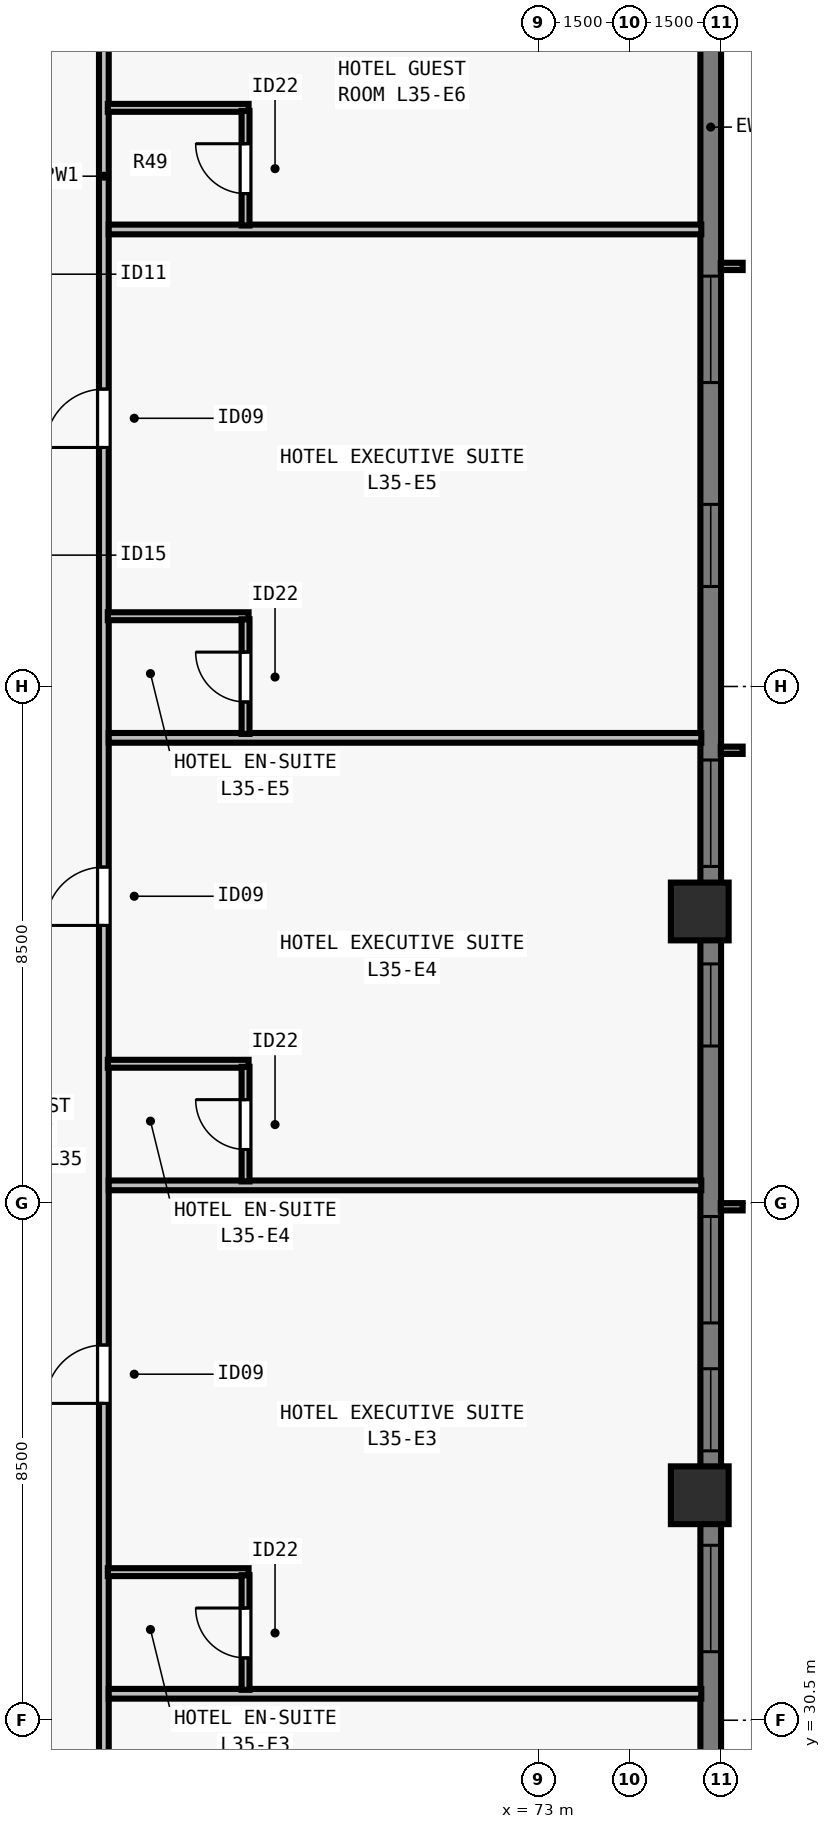
"""IFC4 building model, lengths in metres.
Left out: names, types, materials, properties, quantities, classifications, styles, units other than length and angle.
Written with IfcOpenShell. Run it as: python <this file> out.ifc"""

import sys

from ifc_helpers import new_model, si_unit, direction, frame, frame_2d, origin, origin_2d, place, context, subcontext, project, spatial, rectangle, extrude, element, fill, save


model = new_model("IFC4")
c1 = context("Model", 3, precision=1e-05, world=origin(), true_north=direction((0.0, 1.0)))
c2 = subcontext(c1, "Body", "Model", "MODEL_VIEW")
j1 = project(units=[si_unit("LENGTHUNIT", "METRE"), si_unit("PLANEANGLEUNIT", "RADIAN")], contexts=[c1])
p1 = place(None, origin())
s1 = spatial("IfcSite", under=j1, at=p1, CompositionType="ELEMENT")
p2 = place(p1, origin())
s2 = spatial("IfcBuilding", under=s1, at=p2, CompositionType="ELEMENT")
p3 = place(p2, frame((0.0, 0.0, 130.5)))
s3 = spatial("IfcBuildingStorey", under=s2, at=p3, CompositionType="ELEMENT", Elevation=130.5)
for number, where, z_axis, x_axis in (
    (1, (75.65, 34.2, 0.0), (0.0, 0.0, 1.0), (0.0, 1.0, 0.0)),
    (2, (75.65, 43.8, 0.0), (0.0, 0.0, 1.0), (0.0, 1.0, 0.0)),
):
    element("IfcColumn", number, at=place(p3, frame(where, z_axis=z_axis, x_axis=x_axis)), inside=s3, PredefinedType="COLUMN", context=c2, shape_type="SweptSolid", body=[
        extrude(rectangle(XDim=0.95, YDim=0.95, at=origin_2d()), origin(), (0.0, 0.0, 1.0), 3.5),
    ])
p4 = place(p3, frame((75.83, 59.0, 0.0), z_axis=(0.0, 0.0, 1.0), x_axis=(0.0, -1.0, 0.0)))
e3 = element("IfcWall", 3, at=p4, inside=s3, PredefinedType="SOLIDWALL", context=c2, shape_type="SweptSolid", body=[
    extrude(rectangle(XDim=39.682, YDim=0.34, at=frame_2d((19.841, 0.0))), origin(), (0.0, 0.0, 1.0), 3.28),
])
p5 = place(p4, frame((4.752, 0.0, 0.8)))
e4 = element("IfcOpeningElement", 4, at=p5, cuts=e3, PredefinedType="OPENING", context=c2, shape_type="SweptSolid", body=[
    extrude(rectangle(XDim=1.75, YDim=1.66, at=frame_2d((0.875, 0.83))), frame((0.0, 0.18, 0.0), z_axis=(0.0, -1.0, 0.0), x_axis=(1.0, 0.0, 0.0)), (0.0, 0.0, 1.0), 0.36),
])
p6 = place(p4, frame((8.505, 0.0, 0.8)))
e5 = element("IfcOpeningElement", 5, at=p6, cuts=e3, PredefinedType="OPENING", context=c2, shape_type="SweptSolid", body=[
    extrude(rectangle(XDim=1.35, YDim=1.66, at=frame_2d((0.675, 0.83))), frame((0.0, 0.18, 0.0), z_axis=(0.0, -1.0, 0.0), x_axis=(1.0, 0.0, 0.0)), (0.0, 0.0, 1.0), 0.36),
])
p7 = place(p4, frame((12.709, 0.0, 0.8)))
e6 = element("IfcOpeningElement", 6, at=p7, cuts=e3, PredefinedType="OPENING", context=c2, shape_type="SweptSolid", body=[
    extrude(rectangle(XDim=1.75, YDim=1.66, at=frame_2d((0.875, 0.83))), frame((0.0, 0.18, 0.0), z_axis=(0.0, -1.0, 0.0), x_axis=(1.0, 0.0, 0.0)), (0.0, 0.0, 1.0), 0.36),
])
p8 = place(p4, frame((16.062, 0.0, 0.8)))
e7 = element("IfcOpeningElement", 7, at=p8, cuts=e3, PredefinedType="OPENING", context=c2, shape_type="SweptSolid", body=[
    extrude(rectangle(XDim=1.35, YDim=1.66, at=frame_2d((0.675, 0.83))), frame((0.0, 0.18, 0.0), z_axis=(0.0, -1.0, 0.0), x_axis=(1.0, 0.0, 0.0)), (0.0, 0.0, 1.0), 0.36),
])
p9 = place(p4, frame((20.216, 0.0, 0.8)))
e8 = element("IfcOpeningElement", 8, at=p9, cuts=e3, PredefinedType="OPENING", context=c2, shape_type="SweptSolid", body=[
    extrude(rectangle(XDim=1.75, YDim=1.66, at=frame_2d((0.875, 0.83))), frame((0.0, 0.18, 0.0), z_axis=(0.0, -1.0, 0.0), x_axis=(1.0, 0.0, 0.0)), (0.0, 0.0, 1.0), 0.36),
])
p10 = place(p4, frame((22.719, 0.0, 0.8)))
e9 = element("IfcOpeningElement", 9, at=p10, cuts=e3, PredefinedType="OPENING", context=c2, shape_type="SweptSolid", body=[
    extrude(rectangle(XDim=1.35, YDim=1.66, at=frame_2d((0.675, 0.83))), frame((0.0, 0.18, 0.0), z_axis=(0.0, -1.0, 0.0), x_axis=(1.0, 0.0, 0.0)), (0.0, 0.0, 1.0), 0.36),
])
p11 = place(p4, frame((25.623, 0.0, 0.8)))
e10 = element("IfcOpeningElement", 10, at=p11, cuts=e3, PredefinedType="OPENING", context=c2, shape_type="SweptSolid", body=[
    extrude(rectangle(XDim=1.75, YDim=1.66, at=frame_2d((0.875, 0.83))), frame((0.0, 0.18, 0.0), z_axis=(0.0, -1.0, 0.0), x_axis=(1.0, 0.0, 0.0)), (0.0, 0.0, 1.0), 0.36),
])
p12 = place(p4, frame((29.827, 0.0, 0.8)))
e11 = element("IfcOpeningElement", 11, at=p12, cuts=e3, PredefinedType="OPENING", context=c2, shape_type="SweptSolid", body=[
    extrude(rectangle(XDim=1.35, YDim=1.66, at=frame_2d((0.675, 0.83))), frame((0.0, 0.18, 0.0), z_axis=(0.0, -1.0, 0.0), x_axis=(1.0, 0.0, 0.0)), (0.0, 0.0, 1.0), 0.36),
])
p13 = place(p4, frame((33.18, 0.0, 0.8)))
e12 = element("IfcOpeningElement", 12, at=p13, cuts=e3, PredefinedType="OPENING", context=c2, shape_type="SweptSolid", body=[
    extrude(rectangle(XDim=1.75, YDim=1.66, at=frame_2d((0.875, 0.83))), frame((0.0, 0.18, 0.0), z_axis=(0.0, -1.0, 0.0), x_axis=(1.0, 0.0, 0.0)), (0.0, 0.0, 1.0), 0.36),
])
p14 = place(p4, frame((35.83, 0.0, 0.8)))
e13 = element("IfcOpeningElement", 13, at=p14, cuts=e3, PredefinedType="OPENING", context=c2, shape_type="SweptSolid", body=[
    extrude(rectangle(XDim=0.9, YDim=1.66, at=frame_2d((0.45, 0.83))), frame((0.0, 0.18, 0.0), z_axis=(0.0, -1.0, 0.0), x_axis=(1.0, 0.0, 0.0)), (0.0, 0.0, 1.0), 0.36),
])
p15 = place(p3, frame((65.85, 15.325, 0.0), z_axis=(0.0, 0.0, 1.0), x_axis=(0.0, 1.0, 0.0)))
e14 = element("IfcWall", 14, at=p15, inside=s3, PredefinedType="PARTITIONING", context=c2, shape_type="SweptSolid", body=[
    extrude(rectangle(XDim=47.35, YDim=0.16, at=frame_2d((23.675, 0.0))), origin(), (0.0, 0.0, 1.0), 2.555),
])
p16 = place(p15, frame((4.993, 0.0, 0.0)))
e15 = element("IfcOpeningElement", 15, at=p16, cuts=e14, PredefinedType="OPENING", context=c2, shape_type="SweptSolid", body=[
    extrude(rectangle(XDim=0.96, YDim=2.15, at=frame_2d((0.48, 1.075))), frame((0.0, 0.09, 0.0), z_axis=(0.0, -1.0, 0.0), x_axis=(1.0, 0.0, 0.0)), (0.0, 0.0, 1.0), 0.18),
])
p17 = place(p15, frame((12.525, 0.0, 0.0)))
e16 = element("IfcOpeningElement", 16, at=p17, cuts=e14, PredefinedType="OPENING", context=c2, shape_type="SweptSolid", body=[
    extrude(rectangle(XDim=0.96, YDim=2.15, at=frame_2d((0.48, 1.075))), frame((0.0, 0.09, 0.0), z_axis=(0.0, -1.0, 0.0), x_axis=(1.0, 0.0, 0.0)), (0.0, 0.0, 1.0), 0.18),
])
p18 = place(p15, frame((20.385, 0.0, 0.0)))
e17 = element("IfcOpeningElement", 17, at=p18, cuts=e14, PredefinedType="OPENING", context=c2, shape_type="SweptSolid", body=[
    extrude(rectangle(XDim=0.96, YDim=2.15, at=frame_2d((0.48, 1.075))), frame((0.0, 0.09, 0.0), z_axis=(0.0, -1.0, 0.0), x_axis=(1.0, 0.0, 0.0)), (0.0, 0.0, 1.0), 0.18),
])
p19 = place(p15, frame((28.246, 0.0, 0.0)))
e18 = element("IfcOpeningElement", 18, at=p19, cuts=e14, PredefinedType="OPENING", context=c2, shape_type="SweptSolid", body=[
    extrude(rectangle(XDim=0.96, YDim=2.15, at=frame_2d((0.48, 1.075))), frame((0.0, 0.09, 0.0), z_axis=(0.0, -1.0, 0.0), x_axis=(1.0, 0.0, 0.0)), (0.0, 0.0, 1.0), 0.18),
])
p20 = place(p15, frame((36.105, 0.0, 0.0)))
e19 = element("IfcOpeningElement", 19, at=p20, cuts=e14, PredefinedType="OPENING", context=c2, shape_type="SweptSolid", body=[
    extrude(rectangle(XDim=0.96, YDim=2.15, at=frame_2d((0.48, 1.075))), frame((0.0, 0.09, 0.0), z_axis=(0.0, -1.0, 0.0), x_axis=(1.0, 0.0, 0.0)), (0.0, 0.0, 1.0), 0.18),
])
p21 = place(p15, frame((44.068, 0.0, 0.0)))
e20 = element("IfcOpeningElement", 20, at=p21, cuts=e14, PredefinedType="OPENING", context=c2, shape_type="SweptSolid", body=[
    extrude(rectangle(XDim=0.96, YDim=2.15, at=frame_2d((0.48, 1.075))), frame((0.0, 0.09, 0.0), z_axis=(0.0, -1.0, 0.0), x_axis=(1.0, 0.0, 0.0)), (0.0, 0.0, 1.0), 0.18),
])
p22 = place(p3, frame((65.93, 30.935, 0.0), z_axis=(0.0, 0.0, 1.0), x_axis=(1.0, 0.0, 0.0)))
e21 = element("IfcWall", 21, at=p22, inside=s3, PredefinedType="PARTITIONING", context=c2, shape_type="SweptSolid", body=[
    extrude(rectangle(XDim=9.745, YDim=0.16, at=frame_2d((4.873, 0.0))), origin(), (0.0, 0.0, 1.0), 3.28),
])
p23 = place(p3, frame((65.915, 32.935, 0.0), z_axis=(0.0, 0.0, 1.0), x_axis=(1.0, 0.0, 0.0)))
e22 = element("IfcWall", 22, at=p23, inside=s3, PredefinedType="PLUMBINGWALL", context=c2, shape_type="SweptSolid", body=[
    extrude(rectangle(XDim=2.315, YDim=0.13, at=frame_2d((1.157, 0.0))), origin(), (0.0, 0.0, 1.0), 3.28),
])
p24 = place(p3, frame((68.18, 31.0, 0.0), z_axis=(0.0, 0.0, 1.0), x_axis=(0.0, 1.0, 0.0)))
e23 = element("IfcWall", 23, at=p24, inside=s3, PredefinedType="PLUMBINGWALL", context=c2, shape_type="SweptSolid", body=[
    extrude(rectangle(XDim=1.885, YDim=0.13, at=frame_2d((0.942, 0.0))), origin(), (0.0, 0.0, 1.0), 3.28),
])
p25 = place(p24, frame((0.525, 0.0, 0.0)))
e24 = element("IfcOpeningElement", 24, at=p25, cuts=e23, PredefinedType="OPENING", context=c2, shape_type="SweptSolid", body=[
    extrude(rectangle(XDim=0.82, YDim=2.1, at=frame_2d((0.41, 1.05))), frame((0.0, 0.075, 0.0), z_axis=(0.0, -1.0, 0.0), x_axis=(1.0, 0.0, 0.0)), (0.0, 0.0, 1.0), 0.15),
])
p26 = place(p3, frame((65.93, 39.296, 0.0), z_axis=(0.0, 0.0, 1.0), x_axis=(1.0, 0.0, 0.0)))
e25 = element("IfcWall", 25, at=p26, inside=s3, PredefinedType="PARTITIONING", context=c2, shape_type="SweptSolid", body=[
    extrude(rectangle(XDim=9.745, YDim=0.16, at=frame_2d((4.873, 0.0))), origin(), (0.0, 0.0, 1.0), 3.28),
])
p27 = place(p3, frame((65.915, 41.296, 0.0), z_axis=(0.0, 0.0, 1.0), x_axis=(1.0, 0.0, 0.0)))
e26 = element("IfcWall", 26, at=p27, inside=s3, PredefinedType="PLUMBINGWALL", context=c2, shape_type="SweptSolid", body=[
    extrude(rectangle(XDim=2.315, YDim=0.13, at=frame_2d((1.157, 0.0))), origin(), (0.0, 0.0, 1.0), 3.28),
])
p28 = place(p3, frame((68.18, 39.361, 0.0), z_axis=(0.0, 0.0, 1.0), x_axis=(0.0, 1.0, 0.0)))
e27 = element("IfcWall", 27, at=p28, inside=s3, PredefinedType="PLUMBINGWALL", context=c2, shape_type="SweptSolid", body=[
    extrude(rectangle(XDim=1.885, YDim=0.13, at=frame_2d((0.942, 0.0))), origin(), (0.0, 0.0, 1.0), 3.28),
])
p29 = place(p28, frame((0.525, 0.0, 0.0)))
e28 = element("IfcOpeningElement", 28, at=p29, cuts=e27, PredefinedType="OPENING", context=c2, shape_type="SweptSolid", body=[
    extrude(rectangle(XDim=0.82, YDim=2.1, at=frame_2d((0.41, 1.05))), frame((0.0, 0.075, 0.0), z_axis=(0.0, -1.0, 0.0), x_axis=(1.0, 0.0, 0.0)), (0.0, 0.0, 1.0), 0.15),
])
p30 = place(p3, frame((65.93, 46.655, 0.0), z_axis=(0.0, 0.0, 1.0), x_axis=(1.0, 0.0, 0.0)))
e29 = element("IfcWall", 29, at=p30, inside=s3, PredefinedType="PARTITIONING", context=c2, shape_type="SweptSolid", body=[
    extrude(rectangle(XDim=9.745, YDim=0.16, at=frame_2d((4.873, 0.0))), origin(), (0.0, 0.0, 1.0), 3.28),
])
p31 = place(p3, frame((65.915, 48.655, 0.0), z_axis=(0.0, 0.0, 1.0), x_axis=(1.0, 0.0, 0.0)))
e30 = element("IfcWall", 30, at=p31, inside=s3, PredefinedType="PLUMBINGWALL", context=c2, shape_type="SweptSolid", body=[
    extrude(rectangle(XDim=2.315, YDim=0.13, at=frame_2d((1.157, 0.0))), origin(), (0.0, 0.0, 1.0), 3.28),
])
p32 = place(p3, frame((68.18, 46.72, 0.0), z_axis=(0.0, 0.0, 1.0), x_axis=(0.0, 1.0, 0.0)))
e31 = element("IfcWall", 31, at=p32, inside=s3, PredefinedType="PLUMBINGWALL", context=c2, shape_type="SweptSolid", body=[
    extrude(rectangle(XDim=1.885, YDim=0.13, at=frame_2d((0.942, 0.0))), origin(), (0.0, 0.0, 1.0), 3.28),
])
p33 = place(p32, frame((0.525, 0.0, 0.0)))
e32 = element("IfcOpeningElement", 32, at=p33, cuts=e31, PredefinedType="OPENING", context=c2, shape_type="SweptSolid", body=[
    extrude(rectangle(XDim=0.82, YDim=2.1, at=frame_2d((0.41, 1.05))), frame((0.0, 0.075, 0.0), z_axis=(0.0, -1.0, 0.0), x_axis=(1.0, 0.0, 0.0)), (0.0, 0.0, 1.0), 0.15),
])
p34 = place(p3, frame((65.93, 55.016, 0.0), z_axis=(0.0, 0.0, 1.0), x_axis=(1.0, 0.0, 0.0)))
e33 = element("IfcWall", 33, at=p34, inside=s3, PredefinedType="PARTITIONING", context=c2, shape_type="SweptSolid", body=[
    extrude(rectangle(XDim=9.745, YDim=0.16, at=frame_2d((4.873, 0.0))), origin(), (0.0, 0.0, 1.0), 2.896),
])
p35 = place(p3, frame((65.915, 57.016, 0.0), z_axis=(0.0, 0.0, 1.0), x_axis=(1.0, 0.0, 0.0)))
e34 = element("IfcWall", 34, at=p35, inside=s3, PredefinedType="PLUMBINGWALL", context=c2, shape_type="SweptSolid", body=[
    extrude(rectangle(XDim=2.315, YDim=0.13, at=frame_2d((1.157, 0.0))), origin(), (0.0, 0.0, 1.0), 3.28),
])
p36 = place(p3, frame((68.18, 55.081, 0.0), z_axis=(0.0, 0.0, 1.0), x_axis=(0.0, 1.0, 0.0)))
e35 = element("IfcWall", 35, at=p36, inside=s3, PredefinedType="PLUMBINGWALL", context=c2, shape_type="SweptSolid", body=[
    extrude(rectangle(XDim=1.885, YDim=0.13, at=frame_2d((0.942, 0.0))), origin(), (0.0, 0.0, 1.0), 3.28),
])
p37 = place(p36, frame((0.525, 0.0, 0.0)))
e36 = element("IfcOpeningElement", 36, at=p37, cuts=e35, PredefinedType="OPENING", context=c2, shape_type="SweptSolid", body=[
    extrude(rectangle(XDim=0.82, YDim=2.1, at=frame_2d((0.41, 1.05))), frame((0.0, 0.075, 0.0), z_axis=(0.0, -1.0, 0.0), x_axis=(1.0, 0.0, 0.0)), (0.0, 0.0, 1.0), 0.15),
])
p38 = place(p5, origin())
e37 = element("IfcWindow", 37, at=p38, inside=s3, PartitioningType="SINGLE_PANEL", PredefinedType="WINDOW", context=c2, shape_type="SweptSolid", body=[
    extrude(rectangle(XDim=1.75, YDim=1.66, at=frame_2d((0.875, 0.83))), frame((0.0, -0.05, 0.0), z_axis=(0.0, -1.0, 0.0), x_axis=(1.0, 0.0, 0.0)), (0.0, 0.0, 1.0), 0.06),
])
fill(e4, e37)
p39 = place(p6, origin())
e38 = element("IfcWindow", 38, at=p39, inside=s3, PartitioningType="SINGLE_PANEL", PredefinedType="WINDOW", context=c2, shape_type="SweptSolid", body=[
    extrude(rectangle(XDim=1.35, YDim=1.66, at=frame_2d((0.675, 0.83))), frame((0.0, -0.05, 0.0), z_axis=(0.0, -1.0, 0.0), x_axis=(1.0, 0.0, 0.0)), (0.0, 0.0, 1.0), 0.06),
])
fill(e5, e38)
p40 = place(p7, origin())
e39 = element("IfcWindow", 39, at=p40, inside=s3, PartitioningType="SINGLE_PANEL", PredefinedType="WINDOW", context=c2, shape_type="SweptSolid", body=[
    extrude(rectangle(XDim=1.75, YDim=1.66, at=frame_2d((0.875, 0.83))), frame((0.0, -0.05, 0.0), z_axis=(0.0, -1.0, 0.0), x_axis=(1.0, 0.0, 0.0)), (0.0, 0.0, 1.0), 0.06),
])
fill(e6, e39)
p41 = place(p8, origin())
e40 = element("IfcWindow", 40, at=p41, inside=s3, PartitioningType="SINGLE_PANEL", PredefinedType="WINDOW", context=c2, shape_type="SweptSolid", body=[
    extrude(rectangle(XDim=1.35, YDim=1.66, at=frame_2d((0.675, 0.83))), frame((0.0, -0.05, 0.0), z_axis=(0.0, -1.0, 0.0), x_axis=(1.0, 0.0, 0.0)), (0.0, 0.0, 1.0), 0.06),
])
fill(e7, e40)
p42 = place(p9, origin())
e41 = element("IfcWindow", 41, at=p42, inside=s3, PartitioningType="SINGLE_PANEL", PredefinedType="WINDOW", context=c2, shape_type="SweptSolid", body=[
    extrude(rectangle(XDim=1.75, YDim=1.66, at=frame_2d((0.875, 0.83))), frame((0.0, -0.05, 0.0), z_axis=(0.0, -1.0, 0.0), x_axis=(1.0, 0.0, 0.0)), (0.0, 0.0, 1.0), 0.06),
])
fill(e8, e41)
p43 = place(p10, origin())
e42 = element("IfcWindow", 42, at=p43, inside=s3, PartitioningType="SINGLE_PANEL", PredefinedType="WINDOW", context=c2, shape_type="SweptSolid", body=[
    extrude(rectangle(XDim=1.35, YDim=1.66, at=frame_2d((0.675, 0.83))), frame((0.0, -0.05, 0.0), z_axis=(0.0, -1.0, 0.0), x_axis=(1.0, 0.0, 0.0)), (0.0, 0.0, 1.0), 0.06),
])
fill(e9, e42)
p44 = place(p11, origin())
e43 = element("IfcWindow", 43, at=p44, inside=s3, PartitioningType="SINGLE_PANEL", PredefinedType="WINDOW", context=c2, shape_type="SweptSolid", body=[
    extrude(rectangle(XDim=1.75, YDim=1.66, at=frame_2d((0.875, 0.83))), frame((0.0, -0.05, 0.0), z_axis=(0.0, -1.0, 0.0), x_axis=(1.0, 0.0, 0.0)), (0.0, 0.0, 1.0), 0.06),
])
fill(e10, e43)
p45 = place(p25, origin())
e44 = element("IfcDoor", 44, at=p45, inside=s3, OperationType="SINGLE_SWING_RIGHT", PredefinedType="DOOR", context=c2, shape_type="SweptSolid", body=[
    extrude(rectangle(XDim=0.82, YDim=2.1, at=frame_2d((0.41, 1.05))), frame((0.0, 0.025, 0.0), z_axis=(0.0, -1.0, 0.0), x_axis=(1.0, 0.0, 0.0)), (0.0, 0.0, 1.0), 0.05),
])
fill(e24, e44)
p46 = place(p18, origin())
e45 = element("IfcDoor", 45, at=p46, inside=s3, OperationType="SINGLE_SWING_LEFT", PredefinedType="DOOR", context=c2, shape_type="SweptSolid", body=[
    extrude(rectangle(XDim=0.96, YDim=2.15, at=frame_2d((0.48, 1.075))), frame((0.0, 0.025, 0.0), z_axis=(0.0, -1.0, 0.0), x_axis=(1.0, 0.0, 0.0)), (0.0, 0.0, 1.0), 0.05),
])
fill(e17, e45)
p47 = place(p29, origin())
e46 = element("IfcDoor", 46, at=p47, inside=s3, OperationType="SINGLE_SWING_RIGHT", PredefinedType="DOOR", context=c2, shape_type="SweptSolid", body=[
    extrude(rectangle(XDim=0.82, YDim=2.1, at=frame_2d((0.41, 1.05))), frame((0.0, 0.025, 0.0), z_axis=(0.0, -1.0, 0.0), x_axis=(1.0, 0.0, 0.0)), (0.0, 0.0, 1.0), 0.05),
])
fill(e28, e46)
p48 = place(p19, origin())
e47 = element("IfcDoor", 47, at=p48, inside=s3, OperationType="SINGLE_SWING_LEFT", PredefinedType="DOOR", context=c2, shape_type="SweptSolid", body=[
    extrude(rectangle(XDim=0.96, YDim=2.15, at=frame_2d((0.48, 1.075))), frame((0.0, 0.025, 0.0), z_axis=(0.0, -1.0, 0.0), x_axis=(1.0, 0.0, 0.0)), (0.0, 0.0, 1.0), 0.05),
])
fill(e18, e47)
p49 = place(p33, origin())
e48 = element("IfcDoor", 48, at=p49, inside=s3, OperationType="SINGLE_SWING_RIGHT", PredefinedType="DOOR", context=c2, shape_type="SweptSolid", body=[
    extrude(rectangle(XDim=0.82, YDim=2.1, at=frame_2d((0.41, 1.05))), frame((0.0, 0.025, 0.0), z_axis=(0.0, -1.0, 0.0), x_axis=(1.0, 0.0, 0.0)), (0.0, 0.0, 1.0), 0.05),
])
fill(e32, e48)
p50 = place(p20, origin())
e49 = element("IfcDoor", 49, at=p50, inside=s3, OperationType="SINGLE_SWING_LEFT", PredefinedType="DOOR", context=c2, shape_type="SweptSolid", body=[
    extrude(rectangle(XDim=0.96, YDim=2.15, at=frame_2d((0.48, 1.075))), frame((0.0, 0.025, 0.0), z_axis=(0.0, -1.0, 0.0), x_axis=(1.0, 0.0, 0.0)), (0.0, 0.0, 1.0), 0.05),
])
fill(e19, e49)
p51 = place(p37, origin())
e50 = element("IfcDoor", 50, at=p51, inside=s3, OperationType="SINGLE_SWING_RIGHT", PredefinedType="DOOR", context=c2, shape_type="SweptSolid", body=[
    extrude(rectangle(XDim=0.82, YDim=2.1, at=frame_2d((0.41, 1.05))), frame((0.0, 0.025, 0.0), z_axis=(0.0, -1.0, 0.0), x_axis=(1.0, 0.0, 0.0)), (0.0, 0.0, 1.0), 0.05),
])
fill(e36, e50)
save(model, sys.argv[1])
